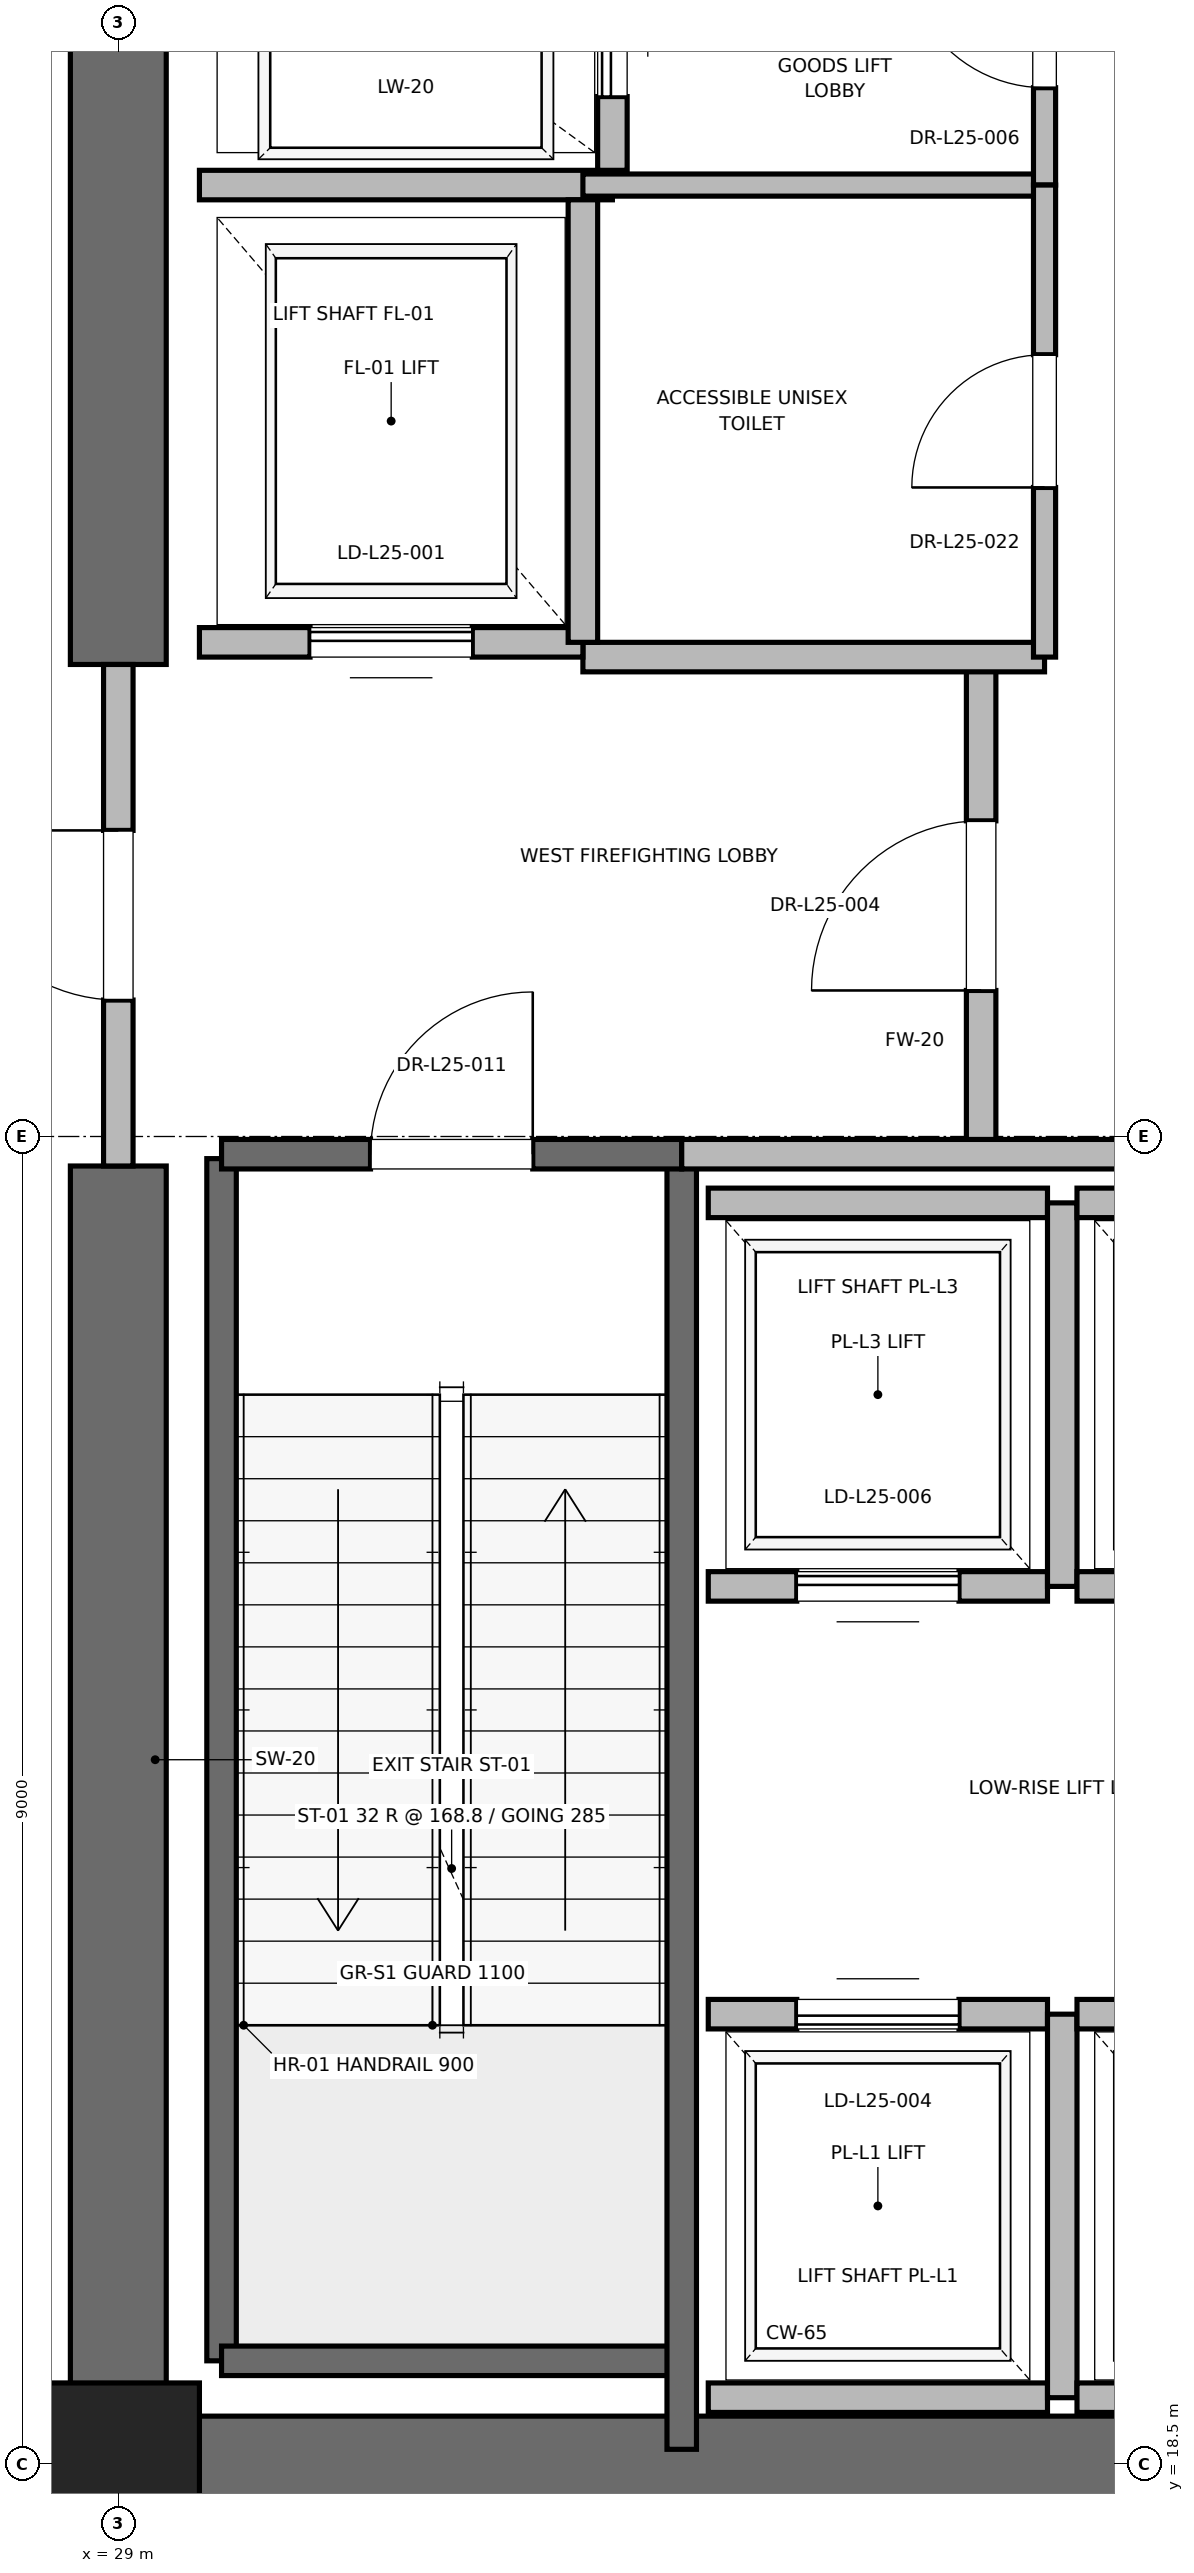
"""IFC4 building model, lengths in metres.
Left out: names, types, materials, properties, quantities, classifications, styles, units other than length and angle.
Written with IfcOpenShell. Run it as: python <this file> out.ifc"""

import sys

from ifc_helpers import new_model, si_unit, direction, frame, frame_2d, origin, origin_2d, place, context, subcontext, project, spatial, rectangle, extrude, element, fill, save


model = new_model("IFC4")
c1 = context("Model", 3, precision=1e-05, world=origin(), true_north=direction((0.0, 1.0)))
c2 = subcontext(c1, "Body", "Model", "MODEL_VIEW")
j1 = project(units=[si_unit("LENGTHUNIT", "METRE"), si_unit("PLANEANGLEUNIT", "RADIAN")], contexts=[c1])
p1 = place(None, origin())
s1 = spatial("IfcSite", under=j1, at=p1, CompositionType="ELEMENT")
p2 = place(p1, origin())
s2 = spatial("IfcBuilding", under=s1, at=p2, CompositionType="ELEMENT")
p3 = place(p2, frame((0.0, 0.0, 107.6)))
s3 = spatial("IfcBuildingStorey", under=s2, at=p3, CompositionType="ELEMENT", Elevation=107.6)
p4 = place(p3, frame((29.0, 18.5, 0.0), z_axis=(0.0, 0.0, 1.0), x_axis=(1.0, 0.0, 0.0)))
e1 = element("IfcColumn", 1, at=p4, inside=s3, PredefinedType="PILASTER", context=c2, shape_type="SweptSolid", body=[
    extrude(rectangle(XDim=1.1, YDim=1.1, at=origin_2d()), origin(), (0.0, 0.0, 1.0), 5.4),
])
p5 = place(p3, frame((29.0, 18.5, 0.0), z_axis=(0.0, 0.0, 1.0), x_axis=(1.0, 0.0, 0.0)))
e2 = element("IfcWall", 2, at=p5, inside=s3, PredefinedType="SHEAR", context=c2, shape_type="SweptSolid", body=[
    extrude(rectangle(XDim=9.2, YDim=0.65, at=frame_2d((4.6, 0.0))), origin(), (0.0, 0.0, 1.0), 5.1),
])
p6 = place(p3, frame((29.0, 18.5, 0.0), z_axis=(0.0, 0.0, 1.0), x_axis=(0.0, 1.0, 0.0)))
e3 = element("IfcWall", 3, at=p6, inside=s3, PredefinedType="SHEAR", context=c2, shape_type="SweptSolid", body=[
    extrude(rectangle(XDim=8.8, YDim=0.65, at=frame_2d((4.4, 0.0))), origin(), (0.0, 0.0, 1.0), 5.1),
])
p7 = place(p3, frame((29.0, 30.7, 0.0), z_axis=(0.0, 0.0, 1.0), x_axis=(0.0, 1.0, 0.0)))
e4 = element("IfcWall", 4, at=p7, inside=s3, PredefinedType="SHEAR", context=c2, shape_type="SweptSolid", body=[
    extrude(rectangle(XDim=5.8, YDim=0.65, at=frame_2d((2.9, 0.0))), origin(), (0.0, 0.0, 1.0), 5.1),
])
p8 = place(p3, frame((29.7, 19.2, 0.0), z_axis=(0.0, 0.0, 1.0), x_axis=(0.0, 1.0, 0.0)))
e5 = element("IfcWall", 5, at=p8, inside=s3, PredefinedType="SOLIDWALL", context=c2, shape_type="SweptSolid", body=[
    extrude(rectangle(XDim=8.15, YDim=0.2, at=frame_2d((4.075, 0.0))), origin(), (0.0, 0.0, 1.0), 5.1),
])
p9 = place(p3, frame((29.7, 19.2, 0.0), z_axis=(0.0, 0.0, 1.0), x_axis=(1.0, 0.0, 0.0)))
e6 = element("IfcWall", 6, at=p9, inside=s3, PredefinedType="SOLIDWALL", context=c2, shape_type="SweptSolid", body=[
    extrude(rectangle(XDim=3.12, YDim=0.2, at=frame_2d((1.56, 0.0))), origin(), (0.0, 0.0, 1.0), 5.1),
])
p10 = place(p3, frame((32.82, 18.6, 0.0), z_axis=(0.0, 0.0, 1.0), x_axis=(0.0, 1.0, 0.0)))
e7 = element("IfcWall", 7, at=p10, inside=s3, PredefinedType="SOLIDWALL", context=c2, shape_type="SweptSolid", body=[
    extrude(rectangle(XDim=8.78, YDim=0.2, at=frame_2d((4.39, 0.0))), origin(), (0.0, 0.0, 1.0), 5.1),
])
p11 = place(p3, frame((29.7, 27.38, 0.0), z_axis=(0.0, 0.0, 1.0), x_axis=(1.0, 0.0, 0.0)))
e8 = element("IfcWall", 8, at=p11, inside=s3, PredefinedType="SOLIDWALL", context=c2, shape_type="SweptSolid", body=[
    extrude(rectangle(XDim=3.12, YDim=0.2, at=frame_2d((1.56, 0.0))), origin(), (0.0, 0.0, 1.0), 5.1),
])
p12 = place(p11, frame((1.01, 0.0, 0.0)))
e9 = element("IfcOpeningElement", 9, at=p12, cuts=e8, PredefinedType="OPENING", context=c2, shape_type="SweptSolid", body=[
    extrude(rectangle(XDim=1.1, YDim=2.15, at=frame_2d((0.55, 1.075))), frame((0.0, 0.1, 0.0), z_axis=(0.0, -1.0, 0.0), x_axis=(1.0, 0.0, 0.0)), (0.0, 0.0, 1.0), 0.2),
])
p13 = place(p3, frame((34.85, 27.38, 0.0), z_axis=(0.0, 0.0, 1.0), x_axis=(0.0, 1.0, 0.0)))
e10 = element("IfcWall", 10, at=p13, inside=s3, PredefinedType="PARTITIONING", context=c2, shape_type="SweptSolid", body=[
    extrude(rectangle(XDim=3.37, YDim=0.2, at=frame_2d((1.685, 0.0))), origin(), (0.0, 0.0, 1.0), 5.1),
])
p14 = place(p13, frame((1.11, 0.0, 0.0)))
e11 = element("IfcOpeningElement", 11, at=p14, cuts=e10, PredefinedType="OPENING", context=c2, shape_type="SweptSolid", body=[
    extrude(rectangle(XDim=1.15, YDim=2.2, at=frame_2d((0.575, 1.1))), frame((0.0, 0.1, 0.0), z_axis=(0.0, -1.0, 0.0), x_axis=(1.0, 0.0, 0.0)), (0.0, 0.0, 1.0), 0.2),
])
p15 = place(p3, frame((29.0, 27.3, 0.0), z_axis=(0.0, 0.0, 1.0), x_axis=(0.0, 1.0, 0.0)))
e12 = element("IfcWall", 12, at=p15, inside=s3, PredefinedType="PARTITIONING", context=c2, shape_type="SweptSolid", body=[
    extrude(rectangle(XDim=3.4, YDim=0.2, at=frame_2d((1.7, 0.0))), origin(), (0.0, 0.0, 1.0), 3.88),
])
p16 = place(p15, frame((1.125, 0.0, 0.0)))
e13 = element("IfcOpeningElement", 13, at=p16, cuts=e12, PredefinedType="OPENING", context=c2, shape_type="SweptSolid", body=[
    extrude(rectangle(XDim=1.15, YDim=2.2, at=frame_2d((0.575, 1.1))), frame((0.0, 0.1, 0.0), z_axis=(0.0, -1.0, 0.0), x_axis=(1.0, 0.0, 0.0)), (0.0, 0.0, 1.0), 0.2),
])
p17 = place(p3, frame((32.82, 27.38, 0.0), z_axis=(0.0, 0.0, 1.0), x_axis=(1.0, 0.0, 0.0)))
e14 = element("IfcWall", 14, at=p17, inside=s3, PredefinedType="PARTITIONING", context=c2, shape_type="SweptSolid", body=[
    extrude(rectangle(XDim=5.62, YDim=0.2, at=frame_2d((2.81, 0.0))), origin(), (0.0, 0.0, 1.0), 5.1),
])
p18 = place(p3, frame((32.15, 30.75, 0.0), z_axis=(0.0, 0.0, 1.0), x_axis=(1.0, 0.0, 0.0)))
e15 = element("IfcWall", 15, at=p18, inside=s3, PredefinedType="PARTITIONING", context=c2, shape_type="SweptSolid", body=[
    extrude(rectangle(XDim=3.13, YDim=0.2, at=frame_2d((1.565, 0.0))), origin(), (0.0, 0.0, 1.0), 5.1),
])
p19 = place(p3, frame((29.55, 30.85, 0.0), z_axis=(0.0, 0.0, 1.0), x_axis=(1.0, 0.0, 0.0)))
e16 = element("IfcWall", 16, at=p19, inside=s3, PredefinedType="SOLIDWALL", context=c2, shape_type="SweptSolid", body=[
    extrude(rectangle(XDim=2.6, YDim=0.2, at=frame_2d((1.3, 0.0))), origin(), (0.0, 0.0, 1.0), 3.88),
])
p20 = place(p19, frame((0.75, 0.0, 0.0)))
e17 = element("IfcOpeningElement", 17, at=p20, cuts=e16, PredefinedType="OPENING", context=c2, shape_type="SweptSolid", body=[
    extrude(rectangle(XDim=1.1, YDim=2.2, at=frame_2d((0.55, 1.1))), frame((0.0, 0.1, 0.0), z_axis=(0.0, -1.0, 0.0), x_axis=(1.0, 0.0, 0.0)), (0.0, 0.0, 1.0), 0.2),
])
p21 = place(p3, frame((29.55, 33.95, 0.0), z_axis=(0.0, 0.0, 1.0), x_axis=(1.0, 0.0, 0.0)))
e18 = element("IfcWall", 18, at=p21, inside=s3, PredefinedType="SOLIDWALL", context=c2, shape_type="SweptSolid", body=[
    extrude(rectangle(XDim=2.8, YDim=0.2, at=frame_2d((1.4, 0.0))), origin(), (0.0, 0.0, 1.0), 5.1),
])
p22 = place(p3, frame((32.15, 30.85, 0.0), z_axis=(0.0, 0.0, 1.0), x_axis=(0.0, 1.0, 0.0)))
e19 = element("IfcWall", 19, at=p22, inside=s3, PredefinedType="SOLIDWALL", context=c2, shape_type="SweptSolid", body=[
    extrude(rectangle(XDim=3.0, YDim=0.2, at=frame_2d((1.5, 0.0))), origin(), (0.0, 0.0, 1.0), 5.1),
])
p23 = place(p3, frame((32.35, 34.05, 0.0), z_axis=(0.0, 0.0, 1.0), x_axis=(0.0, 1.0, 0.0)))
e20 = element("IfcWall", 20, at=p23, inside=s3, PredefinedType="SOLIDWALL", context=c2, shape_type="SweptSolid", body=[
    extrude(rectangle(XDim=2.1, YDim=0.2, at=frame_2d((1.05, 0.0))), origin(), (0.0, 0.0, 1.0), 5.1),
])
p24 = place(p23, frame((0.5, 0.0, 0.0)))
e21 = element("IfcOpeningElement", 21, at=p24, cuts=e20, PredefinedType="OPENING", context=c2, shape_type="SweptSolid", body=[
    extrude(rectangle(XDim=1.1, YDim=2.2, at=frame_2d((0.55, 1.1))), frame((0.0, 0.1, 0.0), z_axis=(0.0, -1.0, 0.0), x_axis=(1.0, 0.0, 0.0)), (0.0, 0.0, 1.0), 0.2),
])
p25 = place(p3, frame((33.0, 18.95, 0.0), z_axis=(0.0, 0.0, 1.0), x_axis=(1.0, 0.0, 0.0)))
e22 = element("IfcWall", 22, at=p25, inside=s3, PredefinedType="SOLIDWALL", context=c2, shape_type="SweptSolid", body=[
    extrude(rectangle(XDim=2.3, YDim=0.2, at=frame_2d((1.15, 0.0))), origin(), (0.0, 0.0, 1.0), 5.1),
])
p26 = place(p3, frame((35.3, 21.55, 0.0), z_axis=(0.0, 0.0, 1.0), x_axis=(-1.0, 0.0, 0.0)))
e23 = element("IfcWall", 23, at=p26, inside=s3, PredefinedType="SOLIDWALL", context=c2, shape_type="SweptSolid", body=[
    extrude(rectangle(XDim=2.3, YDim=0.2, at=frame_2d((1.15, 0.0))), origin(), (0.0, 0.0, 1.0), 5.1),
])
p27 = place(p26, frame((0.6, 0.0, 0.0)))
e24 = element("IfcOpeningElement", 24, at=p27, cuts=e23, PredefinedType="OPENING", context=c2, shape_type="SweptSolid", body=[
    extrude(rectangle(XDim=1.1, YDim=2.2, at=frame_2d((0.55, 1.1))), frame((0.0, 0.1, 0.0), z_axis=(0.0, -1.0, 0.0), x_axis=(1.0, 0.0, 0.0)), (0.0, 0.0, 1.0), 0.2),
])
p28 = place(p3, frame((35.4, 18.95, 0.0), z_axis=(0.0, 0.0, 1.0), x_axis=(0.0, 1.0, 0.0)))
e25 = element("IfcWall", 25, at=p28, inside=s3, PredefinedType="SOLIDWALL", context=c2, shape_type="SweptSolid", body=[
    extrude(rectangle(XDim=2.6, YDim=0.2, at=frame_2d((1.3, 0.0))), origin(), (0.0, 0.0, 1.0), 5.1),
])
p29 = place(p3, frame((35.5, 18.95, 0.0), z_axis=(0.0, 0.0, 1.0), x_axis=(1.0, 0.0, 0.0)))
e26 = element("IfcWall", 26, at=p29, inside=s3, PredefinedType="SOLIDWALL", context=c2, shape_type="SweptSolid", body=[
    extrude(rectangle(XDim=2.3, YDim=0.2, at=frame_2d((1.15, 0.0))), origin(), (0.0, 0.0, 1.0), 3.88),
])
p30 = place(p3, frame((37.8, 21.55, 0.0), z_axis=(0.0, 0.0, 1.0), x_axis=(-1.0, 0.0, 0.0)))
e27 = element("IfcWall", 27, at=p30, inside=s3, PredefinedType="SOLIDWALL", context=c2, shape_type="SweptSolid", body=[
    extrude(rectangle(XDim=2.3, YDim=0.2, at=frame_2d((1.15, 0.0))), origin(), (0.0, 0.0, 1.0), 5.1),
])
p31 = place(p30, frame((0.6, 0.0, 0.0)))
e28 = element("IfcOpeningElement", 28, at=p31, cuts=e27, PredefinedType="OPENING", context=c2, shape_type="SweptSolid", body=[
    extrude(rectangle(XDim=1.1, YDim=2.2, at=frame_2d((0.55, 1.1))), frame((0.0, 0.1, 0.0), z_axis=(0.0, -1.0, 0.0), x_axis=(1.0, 0.0, 0.0)), (0.0, 0.0, 1.0), 0.2),
])
p32 = place(p3, frame((33.0, 24.45, 0.0), z_axis=(0.0, 0.0, 1.0), x_axis=(1.0, 0.0, 0.0)))
e29 = element("IfcWall", 29, at=p32, inside=s3, PredefinedType="SOLIDWALL", context=c2, shape_type="SweptSolid", body=[
    extrude(rectangle(XDim=2.3, YDim=0.2, at=frame_2d((1.15, 0.0))), origin(), (0.0, 0.0, 1.0), 5.1),
])
p33 = place(p32, frame((0.6, 0.0, 0.0)))
e30 = element("IfcOpeningElement", 30, at=p33, cuts=e29, PredefinedType="OPENING", context=c2, shape_type="SweptSolid", body=[
    extrude(rectangle(XDim=1.1, YDim=2.2, at=frame_2d((0.55, 1.1))), frame((0.0, 0.1, 0.0), z_axis=(0.0, -1.0, 0.0), x_axis=(1.0, 0.0, 0.0)), (0.0, 0.0, 1.0), 0.2),
])
p34 = place(p3, frame((35.3, 27.05, 0.0), z_axis=(0.0, 0.0, 1.0), x_axis=(-1.0, 0.0, 0.0)))
e31 = element("IfcWall", 31, at=p34, inside=s3, PredefinedType="SOLIDWALL", context=c2, shape_type="SweptSolid", body=[
    extrude(rectangle(XDim=2.3, YDim=0.2, at=frame_2d((1.15, 0.0))), origin(), (0.0, 0.0, 1.0), 5.1),
])
p35 = place(p3, frame((35.4, 24.45, 0.0), z_axis=(0.0, 0.0, 1.0), x_axis=(0.0, 1.0, 0.0)))
e32 = element("IfcWall", 32, at=p35, inside=s3, PredefinedType="SOLIDWALL", context=c2, shape_type="SweptSolid", body=[
    extrude(rectangle(XDim=2.6, YDim=0.2, at=frame_2d((1.3, 0.0))), origin(), (0.0, 0.0, 1.0), 5.1),
])
p36 = place(p3, frame((35.5, 24.45, 0.0), z_axis=(0.0, 0.0, 1.0), x_axis=(1.0, 0.0, 0.0)))
e33 = element("IfcWall", 33, at=p36, inside=s3, PredefinedType="SOLIDWALL", context=c2, shape_type="SweptSolid", body=[
    extrude(rectangle(XDim=2.3, YDim=0.2, at=frame_2d((1.15, 0.0))), origin(), (0.0, 0.0, 1.0), 5.1),
])
p37 = place(p36, frame((0.6, 0.0, 0.0)))
e34 = element("IfcOpeningElement", 34, at=p37, cuts=e33, PredefinedType="OPENING", context=c2, shape_type="SweptSolid", body=[
    extrude(rectangle(XDim=1.1, YDim=2.2, at=frame_2d((0.55, 1.1))), frame((0.0, 0.1, 0.0), z_axis=(0.0, -1.0, 0.0), x_axis=(1.0, 0.0, 0.0)), (0.0, 0.0, 1.0), 0.2),
])
p38 = place(p3, frame((37.8, 27.05, 0.0), z_axis=(0.0, 0.0, 1.0), x_axis=(-1.0, 0.0, 0.0)))
e35 = element("IfcWall", 35, at=p38, inside=s3, PredefinedType="SOLIDWALL", context=c2, shape_type="SweptSolid", body=[
    extrude(rectangle(XDim=2.3, YDim=0.2, at=frame_2d((1.15, 0.0))), origin(), (0.0, 0.0, 1.0), 5.1),
])
p39 = place(p3, frame((32.15, 33.95, 0.0), z_axis=(0.0, 0.0, 1.0), x_axis=(1.0, 0.0, 0.0)))
e36 = element("IfcWall", 36, at=p39, inside=s3, PredefinedType="PARTITIONING", context=c2, shape_type="SweptSolid", body=[
    extrude(rectangle(XDim=3.13, YDim=0.15, at=frame_2d((1.565, 0.0))), origin(), (0.0, 0.0, 1.0), 2.85),
])
p40 = place(p3, frame((35.28, 33.95, 0.0), z_axis=(0.0, 0.0, 1.0), x_axis=(0.0, 1.0, 0.0)))
e37 = element("IfcWall", 37, at=p40, inside=s3, PredefinedType="PARTITIONING", context=c2, shape_type="SweptSolid", body=[
    extrude(rectangle(XDim=2.27, YDim=0.15, at=frame_2d((1.135, 0.0))), origin(), (0.0, 0.0, 1.0), 2.85),
])
p41 = place(p40, frame((0.66, 0.0, 0.0)))
e38 = element("IfcOpeningElement", 38, at=p41, cuts=e37, PredefinedType="OPENING", context=c2, shape_type="SweptSolid", body=[
    extrude(rectangle(XDim=0.95, YDim=2.15, at=frame_2d((0.475, 1.075))), frame((0.0, 0.075, 0.0), z_axis=(0.0, -1.0, 0.0), x_axis=(1.0, 0.0, 0.0)), (0.0, 0.0, 1.0), 0.15),
])
p42 = place(p3, frame((35.28, 30.75, 0.0), z_axis=(0.0, 0.0, 1.0), x_axis=(0.0, 1.0, 0.0)))
e39 = element("IfcWall", 39, at=p42, inside=s3, PredefinedType="PARTITIONING", context=c2, shape_type="SweptSolid", body=[
    extrude(rectangle(XDim=3.2, YDim=0.15, at=frame_2d((1.6, 0.0))), origin(), (0.0, 0.0, 1.0), 2.85),
])
p43 = place(p42, frame((1.15, 0.0, 0.0)))
e40 = element("IfcOpeningElement", 40, at=p43, cuts=e39, PredefinedType="OPENING", context=c2, shape_type="SweptSolid", body=[
    extrude(rectangle(XDim=0.9, YDim=2.1, at=frame_2d((0.45, 1.05))), frame((0.0, 0.075, 0.0), z_axis=(0.0, -1.0, 0.0), x_axis=(1.0, 0.0, 0.0)), (0.0, 0.0, 1.0), 0.15),
])
p44 = place(p12, origin())
e41 = element("IfcDoor", 41, at=p44, inside=s3, OperationType="SINGLE_SWING_RIGHT", PredefinedType="DOOR", context=c2, shape_type="SweptSolid", body=[
    extrude(rectangle(XDim=1.1, YDim=2.15, at=frame_2d((0.55, 1.075))), frame((0.0, 0.025, 0.0), z_axis=(0.0, -1.0, 0.0), x_axis=(1.0, 0.0, 0.0)), (0.0, 0.0, 1.0), 0.05),
])
fill(e9, e41)
p45 = place(p14, origin())
e42 = element("IfcDoor", 42, at=p45, inside=s3, OperationType="SINGLE_SWING_LEFT", PredefinedType="DOOR", context=c2, shape_type="SweptSolid", body=[
    extrude(rectangle(XDim=1.15, YDim=2.2, at=frame_2d((0.575, 1.1))), frame((0.0, 0.025, 0.0), z_axis=(0.0, -1.0, 0.0), x_axis=(1.0, 0.0, 0.0)), (0.0, 0.0, 1.0), 0.05),
])
fill(e11, e42)
p46 = place(p16, origin())
e43 = element("IfcDoor", 43, at=p46, inside=s3, OperationType="SINGLE_SWING_RIGHT", PredefinedType="DOOR", context=c2, shape_type="SweptSolid", body=[
    extrude(rectangle(XDim=1.15, YDim=2.2, at=frame_2d((0.575, 1.1))), frame((0.0, 0.025, 0.0), z_axis=(0.0, -1.0, 0.0), x_axis=(1.0, 0.0, 0.0)), (0.0, 0.0, 1.0), 0.05),
])
fill(e13, e43)
p47 = place(p20, origin())
e44 = element("IfcDoor", 44, at=p47, inside=s3, OperationType="SLIDING_TO_RIGHT", PredefinedType="DOOR", context=c2, shape_type="SweptSolid", body=[
    extrude(rectangle(XDim=1.1, YDim=2.2, at=frame_2d((0.55, 1.1))), frame((0.0, 0.025, 0.0), z_axis=(0.0, -1.0, 0.0), x_axis=(1.0, 0.0, 0.0)), (0.0, 0.0, 1.0), 0.05),
])
fill(e17, e44)
p48 = place(p24, origin())
e45 = element("IfcDoor", 45, at=p48, inside=s3, OperationType="SLIDING_TO_RIGHT", PredefinedType="DOOR", context=c2, shape_type="SweptSolid", body=[
    extrude(rectangle(XDim=1.1, YDim=2.2, at=frame_2d((0.55, 1.1))), frame((0.0, 0.025, 0.0), z_axis=(0.0, -1.0, 0.0), x_axis=(1.0, 0.0, 0.0)), (0.0, 0.0, 1.0), 0.05),
])
fill(e21, e45)
p49 = place(p27, origin())
e46 = element("IfcDoor", 46, at=p49, inside=s3, OperationType="SLIDING_TO_RIGHT", PredefinedType="DOOR", context=c2, shape_type="SweptSolid", body=[
    extrude(rectangle(XDim=1.1, YDim=2.2, at=frame_2d((0.55, 1.1))), frame((0.0, 0.025, 0.0), z_axis=(0.0, -1.0, 0.0), x_axis=(1.0, 0.0, 0.0)), (0.0, 0.0, 1.0), 0.05),
])
fill(e24, e46)
p50 = place(p33, origin())
e47 = element("IfcDoor", 47, at=p50, inside=s3, OperationType="SLIDING_TO_RIGHT", PredefinedType="DOOR", context=c2, shape_type="SweptSolid", body=[
    extrude(rectangle(XDim=1.1, YDim=2.2, at=frame_2d((0.55, 1.1))), frame((0.0, 0.025, 0.0), z_axis=(0.0, -1.0, 0.0), x_axis=(1.0, 0.0, 0.0)), (0.0, 0.0, 1.0), 0.05),
])
fill(e30, e47)
p51 = place(p41, origin())
e48 = element("IfcDoor", 48, at=p51, inside=s3, OperationType="SINGLE_SWING_RIGHT", PredefinedType="DOOR", context=c2, shape_type="SweptSolid", body=[
    extrude(rectangle(XDim=0.95, YDim=2.15, at=frame_2d((0.475, 1.075))), frame((0.0, 0.025, 0.0), z_axis=(0.0, -1.0, 0.0), x_axis=(1.0, 0.0, 0.0)), (0.0, 0.0, 1.0), 0.05),
])
fill(e38, e48)
p52 = place(p43, origin())
e49 = element("IfcDoor", 49, at=p52, inside=s3, OperationType="SINGLE_SWING_LEFT", PredefinedType="DOOR", context=c2, shape_type="SweptSolid", body=[
    extrude(rectangle(XDim=0.9, YDim=2.1, at=frame_2d((0.45, 1.05))), frame((0.0, 0.025, 0.0), z_axis=(0.0, -1.0, 0.0), x_axis=(1.0, 0.0, 0.0)), (0.0, 0.0, 1.0), 0.05),
])
fill(e40, e49)
save(model, sys.argv[1])
